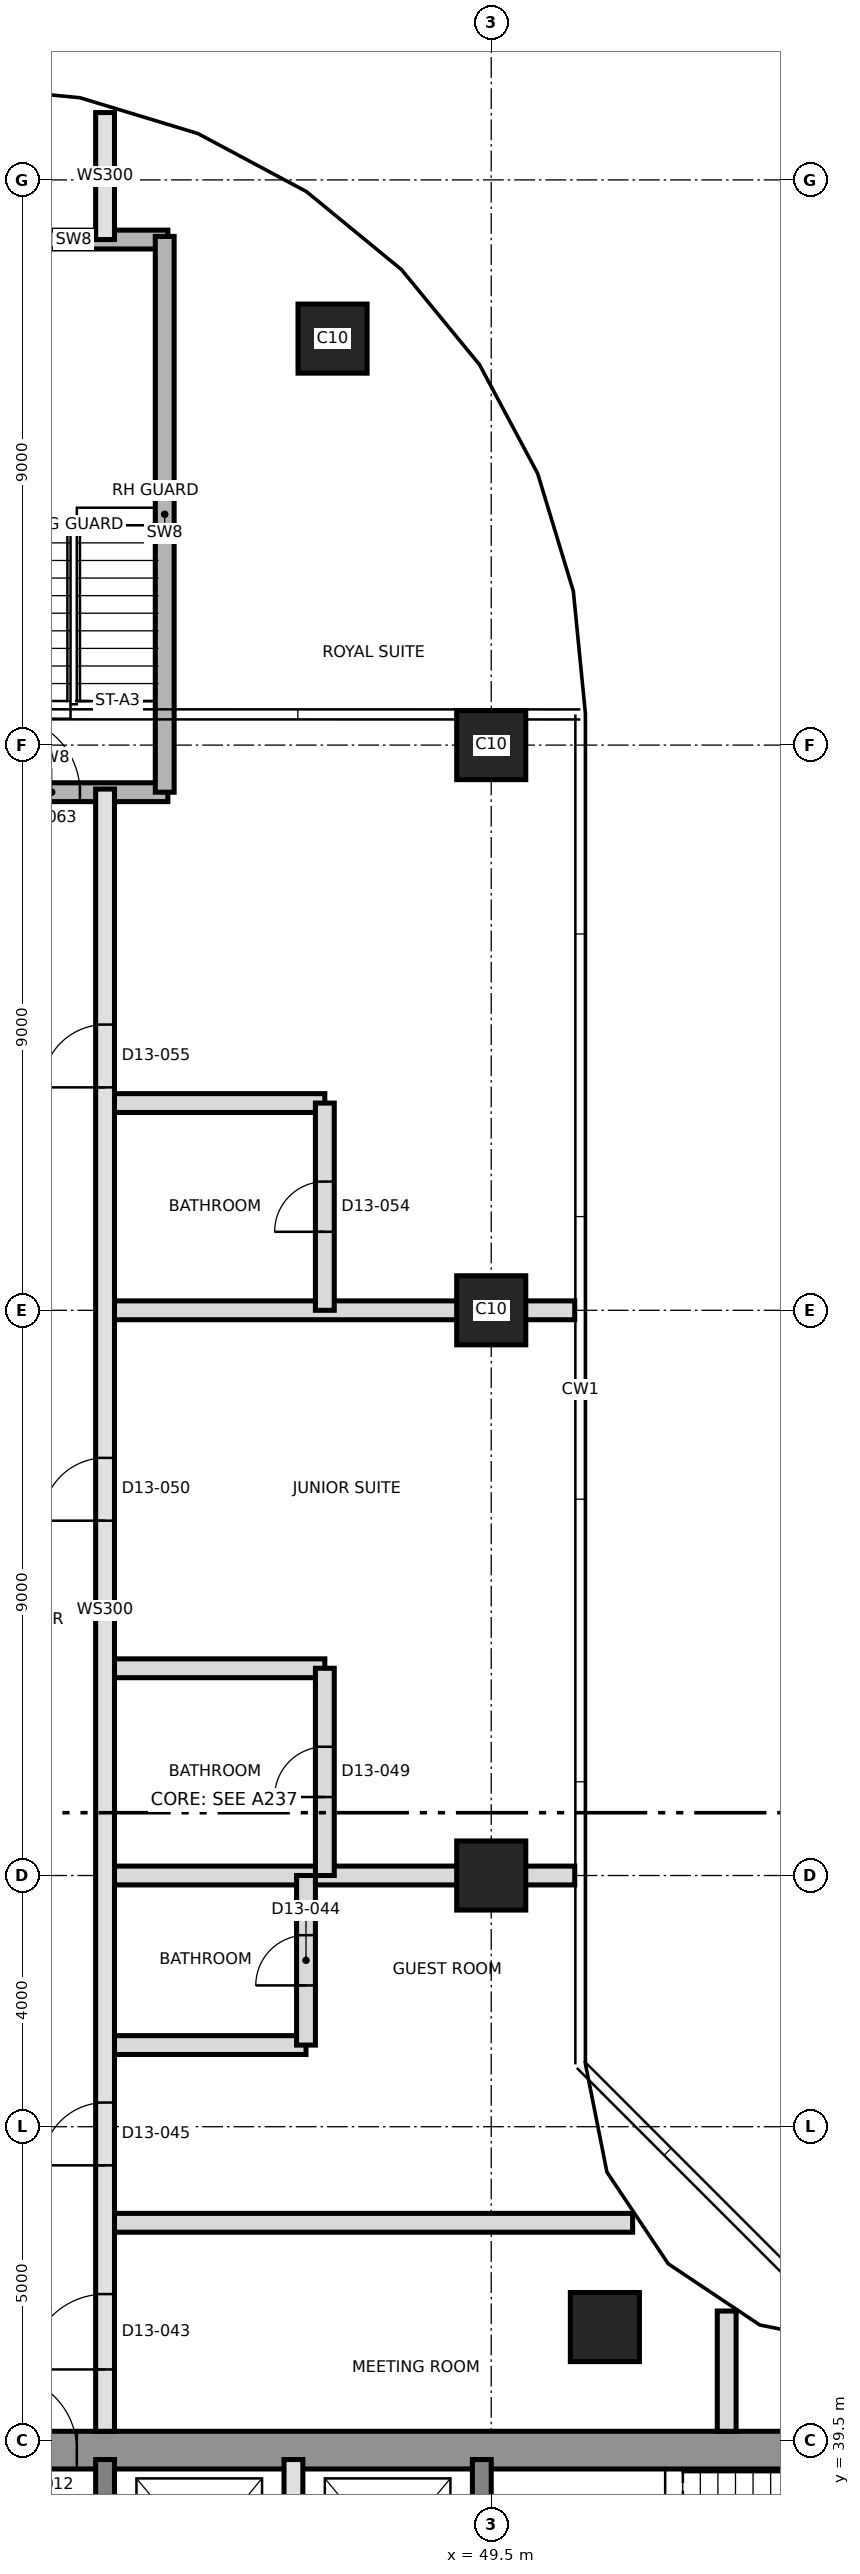
"""IFC4 building model, lengths in metres.
Left out: names, types, materials, properties, quantities, classifications, styles, units other than length and angle.
Written with IfcOpenShell. Run it as: python <this file> out.ifc"""

import sys

from ifc_helpers import new_model, si_unit, direction, frame, frame_2d, origin, origin_2d, place, context, subcontext, project, spatial, rectangle, extrude, element, fill, save


model = new_model("IFC4")
c1 = context("Model", 3, precision=1e-05, world=origin(), true_north=direction((0.0, 1.0)))
c2 = subcontext(c1, "Body", "Model", "MODEL_VIEW")
j1 = project(units=[si_unit("LENGTHUNIT", "METRE"), si_unit("PLANEANGLEUNIT", "RADIAN")], contexts=[c1])
p1 = place(None, origin())
s1 = spatial("IfcSite", under=j1, at=p1, CompositionType="ELEMENT")
p2 = place(p1, origin())
s2 = spatial("IfcBuilding", under=s1, at=p2, CompositionType="ELEMENT")
p3 = place(p2, frame((0.0, 0.0, 142.2)))
s3 = spatial("IfcBuildingStorey", under=s2, at=p3, CompositionType="ELEMENT", Elevation=142.2)
p4 = place(p3, frame((31.2, 39.35, 0.0), z_axis=(0.0, 0.0, 1.0), x_axis=(1.0, 0.0, 0.0)))
e1 = element("IfcWall", 1, at=p4, inside=s3, PredefinedType="SHEAR", context=c2, shape_type="SweptSolid", body=[
    extrude(rectangle(XDim=27.0, YDim=0.6, at=frame_2d((13.5, 0.0))), origin(), (0.0, 0.0, 1.0), 3.7),
])
p5 = place(p4, frame((10.5, 0.0, 0.0)))
e2 = element("IfcOpeningElement", 2, at=p5, cuts=e1, PredefinedType="OPENING", context=c2, shape_type="SweptSolid", body=[
    extrude(rectangle(XDim=1.2, YDim=2.1, at=frame_2d((0.6, 1.05))), frame((0.0, 0.31, 0.0), z_axis=(0.0, -1.0, 0.0), x_axis=(1.0, 0.0, 0.0)), (0.0, 0.0, 1.0), 0.62),
])
for number, where, z_axis, x_axis in (
    (3, (43.35, 33.5, 0.0), (0.0, 0.0, 1.0), (0.0, 1.0, 0.0)),
    (4, (49.35, 33.5, 0.0), (0.0, 0.0, 1.0), (0.0, 1.0, 0.0)),
):
    element("IfcWall", number, at=place(p3, frame(where, z_axis=z_axis, x_axis=x_axis)), inside=s3, PredefinedType="SHEAR", context=c2, shape_type="SweptSolid", body=[
        extrude(rectangle(XDim=5.7, YDim=0.3, at=frame_2d((2.85, 0.0))), origin(), (0.0, 0.0, 1.0), 3.7),
    ])
for number, where, z_axis, x_axis in (
    (5, (51.31, 41.31, 0.0), (0.0, 0.0, 1.0), (1.0, 0.0, 0.0)),
    (6, (49.5, 48.5, 0.0), (0.0, 0.0, 1.0), (1.0, 0.0, 0.0)),
    (7, (49.5, 57.5, 0.0), (0.0, 0.0, 1.0), (1.0, 0.0, 0.0)),
    (8, (49.5, 66.5, 0.0), (0.0, 0.0, 1.0), (1.0, 0.0, 0.0)),
    (9, (46.973, 72.973, 0.0), (0.0, 0.0, 1.0), (1.0, 0.0, 0.0)),
):
    element("IfcColumn", number, at=place(p3, frame(where, z_axis=z_axis, x_axis=x_axis)), inside=s3, PredefinedType="COLUMN", context=c2, shape_type="SweptSolid", body=[
        extrude(rectangle(XDim=1.1, YDim=1.1, at=origin_2d()), origin(), (0.0, 0.0, 1.0), 3.7),
    ])
p6 = place(p3, frame((46.35, 36.2, 0.0), z_axis=(0.0, 0.0, 1.0), x_axis=(0.0, 1.0, 0.0)))
e10 = element("IfcWall", 10, at=p6, inside=s3, PredefinedType="SOLIDWALL", context=c2, shape_type="SweptSolid", body=[
    extrude(rectangle(XDim=3.0, YDim=0.3, at=frame_2d((1.5, 0.0))), origin(), (0.0, 0.0, 1.0), 3.4),
])
p7 = place(p3, frame((43.35, 42.97, 0.0), z_axis=(0.0, 0.0, 1.0), x_axis=(1.0, 0.0, 0.0)))
e11 = element("IfcWall", 11, at=p7, inside=s3, PredefinedType="PARTITIONING", context=c2, shape_type="SweptSolid", body=[
    extrude(rectangle(XDim=8.402, YDim=0.3, at=frame_2d((4.201, 0.0))), origin(), (0.0, 0.0, 1.0), 3.4),
])
p8 = place(p3, frame((43.35, 45.8, 0.0), z_axis=(0.0, 0.0, 1.0), x_axis=(1.0, 0.0, 0.0)))
e12 = element("IfcWall", 12, at=p8, inside=s3, PredefinedType="PARTITIONING", context=c2, shape_type="SweptSolid", body=[
    extrude(rectangle(XDim=3.2, YDim=0.3, at=frame_2d((1.6, 0.0))), origin(), (0.0, 0.0, 1.0), 3.4),
])
p9 = place(p3, frame((43.35, 48.5, 0.0), z_axis=(0.0, 0.0, 1.0), x_axis=(1.0, 0.0, 0.0)))
e13 = element("IfcWall", 13, at=p9, inside=s3, PredefinedType="PARTITIONING", context=c2, shape_type="SweptSolid", body=[
    extrude(rectangle(XDim=7.48, YDim=0.3, at=frame_2d((3.74, 0.0))), origin(), (0.0, 0.0, 1.0), 3.4),
])
p10 = place(p3, frame((43.35, 51.8, 0.0), z_axis=(0.0, 0.0, 1.0), x_axis=(1.0, 0.0, 0.0)))
e14 = element("IfcWall", 14, at=p10, inside=s3, PredefinedType="PARTITIONING", context=c2, shape_type="SweptSolid", body=[
    extrude(rectangle(XDim=3.5, YDim=0.3, at=frame_2d((1.75, 0.0))), origin(), (0.0, 0.0, 1.0), 3.4),
])
p11 = place(p3, frame((43.35, 57.5, 0.0), z_axis=(0.0, 0.0, 1.0), x_axis=(1.0, 0.0, 0.0)))
e15 = element("IfcWall", 15, at=p11, inside=s3, PredefinedType="PARTITIONING", context=c2, shape_type="SweptSolid", body=[
    extrude(rectangle(XDim=7.48, YDim=0.3, at=frame_2d((3.74, 0.0))), origin(), (0.0, 0.0, 1.0), 3.4),
])
p12 = place(p3, frame((43.35, 60.8, 0.0), z_axis=(0.0, 0.0, 1.0), x_axis=(1.0, 0.0, 0.0)))
e16 = element("IfcWall", 16, at=p12, inside=s3, PredefinedType="PARTITIONING", context=c2, shape_type="SweptSolid", body=[
    extrude(rectangle(XDim=3.5, YDim=0.3, at=frame_2d((1.75, 0.0))), origin(), (0.0, 0.0, 1.0), 3.4),
])
p13 = place(p3, frame((40.65, 65.75, 0.0), z_axis=(0.0, 0.0, 1.0), x_axis=(1.0, 0.0, 0.0)))
e17 = element("IfcWall", 17, at=p13, inside=s3, PredefinedType="SHEAR", context=c2, shape_type="SweptSolid", body=[
    extrude(rectangle(XDim=3.7, YDim=0.3, at=frame_2d((1.85, 0.0))), origin(), (0.0, 0.0, 1.0), 3.4),
])
p14 = place(p13, frame((1.1, 0.0, 0.0)))
e18 = element("IfcOpeningElement", 18, at=p14, cuts=e17, PredefinedType="OPENING", context=c2, shape_type="SweptSolid", body=[
    extrude(rectangle(XDim=1.2, YDim=2.1, at=frame_2d((0.6, 1.05))), frame((0.0, 0.16, 0.0), z_axis=(0.0, -1.0, 0.0), x_axis=(1.0, 0.0, 0.0)), (0.0, 0.0, 1.0), 0.32),
])
p15 = place(p3, frame((41.35, 74.55, 0.0), z_axis=(0.0, 0.0, 1.0), x_axis=(1.0, 0.0, 0.0)))
e19 = element("IfcWall", 19, at=p15, inside=s3, PredefinedType="SHEAR", context=c2, shape_type="SweptSolid", body=[
    extrude(rectangle(XDim=3.0, YDim=0.3, at=frame_2d((1.5, 0.0))), origin(), (0.0, 0.0, 1.0), 3.4),
])
p16 = place(p3, frame((43.35, 39.65, 0.0), z_axis=(0.0, 0.0, 1.0), x_axis=(0.0, 1.0, 0.0)))
e20 = element("IfcWall", 20, at=p16, inside=s3, PredefinedType="SOLIDWALL", context=c2, shape_type="SweptSolid", body=[
    extrude(rectangle(XDim=26.15, YDim=0.3, at=frame_2d((13.075, 0.0))), origin(), (0.0, 0.0, 1.0), 3.4),
])
p17 = place(p16, frame((0.985, 0.0, 0.0)))
e21 = element("IfcOpeningElement", 21, at=p17, cuts=e20, PredefinedType="OPENING", context=c2, shape_type="SweptSolid", body=[
    extrude(rectangle(XDim=1.2, YDim=2.1, at=frame_2d((0.6, 1.05))), frame((0.0, 0.16, 0.0), z_axis=(0.0, -1.0, 0.0), x_axis=(1.0, 0.0, 0.0)), (0.0, 0.0, 1.0), 0.32),
])
p18 = place(p16, frame((4.235, 0.0, 0.0)))
e22 = element("IfcOpeningElement", 22, at=p18, cuts=e20, PredefinedType="OPENING", context=c2, shape_type="SweptSolid", body=[
    extrude(rectangle(XDim=1.0, YDim=2.1, at=frame_2d((0.5, 1.05))), frame((0.0, 0.16, 0.0), z_axis=(0.0, -1.0, 0.0), x_axis=(1.0, 0.0, 0.0)), (0.0, 0.0, 1.0), 0.32),
])
p19 = place(p16, frame((14.5, 0.0, 0.0)))
e23 = element("IfcOpeningElement", 23, at=p19, cuts=e20, PredefinedType="OPENING", context=c2, shape_type="SweptSolid", body=[
    extrude(rectangle(XDim=1.0, YDim=2.4, at=frame_2d((0.5, 1.2))), frame((0.0, 0.16, 0.0), z_axis=(0.0, -1.0, 0.0), x_axis=(1.0, 0.0, 0.0)), (0.0, 0.0, 1.0), 0.32),
])
p20 = place(p16, frame((21.4, 0.0, 0.0)))
e24 = element("IfcOpeningElement", 24, at=p20, cuts=e20, PredefinedType="OPENING", context=c2, shape_type="SweptSolid", body=[
    extrude(rectangle(XDim=1.0, YDim=2.4, at=frame_2d((0.5, 1.2))), frame((0.0, 0.16, 0.0), z_axis=(0.0, -1.0, 0.0), x_axis=(1.0, 0.0, 0.0)), (0.0, 0.0, 1.0), 0.32),
])
p21 = place(p3, frame((43.35, 74.55, 0.0), z_axis=(0.0, 0.0, 1.0), x_axis=(0.0, 1.0, 0.0)))
e25 = element("IfcWall", 25, at=p21, inside=s3, PredefinedType="SOLIDWALL", context=c2, shape_type="SweptSolid", body=[
    extrude(rectangle(XDim=2.022, YDim=0.3, at=frame_2d((1.011, 0.0))), origin(), (0.0, 0.0, 1.0), 3.4),
])
p22 = place(p3, frame((44.3, 65.75, 0.0), z_axis=(0.0, 0.0, 1.0), x_axis=(0.0, 1.0, 0.0)))
e26 = element("IfcWall", 26, at=p22, inside=s3, PredefinedType="SHEAR", context=c2, shape_type="SweptSolid", body=[
    extrude(rectangle(XDim=8.85, YDim=0.3, at=frame_2d((4.425, 0.0))), origin(), (0.0, 0.0, 1.0), 3.4),
])
p23 = place(p3, frame((46.55, 45.8, 0.0), z_axis=(0.0, 0.0, 1.0), x_axis=(0.0, 1.0, 0.0)))
e27 = element("IfcWall", 27, at=p23, inside=s3, PredefinedType="PARTITIONING", context=c2, shape_type="SweptSolid", body=[
    extrude(rectangle(XDim=2.7, YDim=0.3, at=frame_2d((1.35, 0.0))), origin(), (0.0, 0.0, 1.0), 3.4),
])
p24 = place(p23, frame((0.95, 0.0, 0.0)))
e28 = element("IfcOpeningElement", 28, at=p24, cuts=e27, PredefinedType="OPENING", context=c2, shape_type="SweptSolid", body=[
    extrude(rectangle(XDim=0.8, YDim=2.1, at=frame_2d((0.4, 1.05))), frame((0.0, 0.16, 0.0), z_axis=(0.0, -1.0, 0.0), x_axis=(1.0, 0.0, 0.0)), (0.0, 0.0, 1.0), 0.32),
])
p25 = place(p3, frame((46.85, 48.5, 0.0), z_axis=(0.0, 0.0, 1.0), x_axis=(0.0, 1.0, 0.0)))
e29 = element("IfcWall", 29, at=p25, inside=s3, PredefinedType="PARTITIONING", context=c2, shape_type="SweptSolid", body=[
    extrude(rectangle(XDim=3.3, YDim=0.3, at=frame_2d((1.65, 0.0))), origin(), (0.0, 0.0, 1.0), 3.4),
])
p26 = place(p25, frame((1.25, 0.0, 0.0)))
e30 = element("IfcOpeningElement", 30, at=p26, cuts=e29, PredefinedType="OPENING", context=c2, shape_type="SweptSolid", body=[
    extrude(rectangle(XDim=0.8, YDim=2.1, at=frame_2d((0.4, 1.05))), frame((0.0, 0.16, 0.0), z_axis=(0.0, -1.0, 0.0), x_axis=(1.0, 0.0, 0.0)), (0.0, 0.0, 1.0), 0.32),
])
p27 = place(p3, frame((46.85, 57.5, 0.0), z_axis=(0.0, 0.0, 1.0), x_axis=(0.0, 1.0, 0.0)))
e31 = element("IfcWall", 31, at=p27, inside=s3, PredefinedType="PARTITIONING", context=c2, shape_type="SweptSolid", body=[
    extrude(rectangle(XDim=3.3, YDim=0.3, at=frame_2d((1.65, 0.0))), origin(), (0.0, 0.0, 1.0), 3.4),
])
p28 = place(p27, frame((1.25, 0.0, 0.0)))
e32 = element("IfcOpeningElement", 32, at=p28, cuts=e31, PredefinedType="OPENING", context=c2, shape_type="SweptSolid", body=[
    extrude(rectangle(XDim=0.8, YDim=2.1, at=frame_2d((0.4, 1.05))), frame((0.0, 0.16, 0.0), z_axis=(0.0, -1.0, 0.0), x_axis=(1.0, 0.0, 0.0)), (0.0, 0.0, 1.0), 0.32),
])
p29 = place(p3, frame((53.25, 39.65, 0.0), z_axis=(0.0, 0.0, 1.0), x_axis=(0.0, 1.0, 0.0)))
e33 = element("IfcWall", 33, at=p29, inside=s3, PredefinedType="PARTITIONING", context=c2, shape_type="SweptSolid", body=[
    extrude(rectangle(XDim=1.915, YDim=0.3, at=frame_2d((0.958, 0.0))), origin(), (0.0, 0.0, 1.0), 3.4),
])
p30 = place(p5, origin())
e34 = element("IfcDoor", 34, at=p30, inside=s3, OperationType="SINGLE_SWING_RIGHT", PredefinedType="DOOR", context=c2, shape_type="SweptSolid", body=[
    extrude(rectangle(XDim=1.2, YDim=2.1, at=frame_2d((0.6, 1.05))), frame((0.0, 0.025, 0.0), z_axis=(0.0, -1.0, 0.0), x_axis=(1.0, 0.0, 0.0)), (0.0, 0.0, 1.0), 0.05),
])
fill(e2, e34)
p31 = place(p17, origin())
e35 = element("IfcDoor", 35, at=p31, inside=s3, OperationType="SINGLE_SWING_RIGHT", PredefinedType="DOOR", context=c2, shape_type="SweptSolid", body=[
    extrude(rectangle(XDim=1.2, YDim=2.1, at=frame_2d((0.6, 1.05))), frame((0.0, 0.025, 0.0), z_axis=(0.0, -1.0, 0.0), x_axis=(1.0, 0.0, 0.0)), (0.0, 0.0, 1.0), 0.05),
])
fill(e21, e35)
p32 = place(p24, origin())
e36 = element("IfcDoor", 36, at=p32, inside=s3, OperationType="SINGLE_SWING_LEFT", PredefinedType="DOOR", context=c2, shape_type="SweptSolid", body=[
    extrude(rectangle(XDim=0.8, YDim=2.1, at=frame_2d((0.4, 1.05))), frame((0.0, 0.025, 0.0), z_axis=(0.0, -1.0, 0.0), x_axis=(1.0, 0.0, 0.0)), (0.0, 0.0, 1.0), 0.05),
])
fill(e28, e36)
p33 = place(p18, origin())
e37 = element("IfcDoor", 37, at=p33, inside=s3, OperationType="SINGLE_SWING_LEFT", PredefinedType="DOOR", context=c2, shape_type="SweptSolid", body=[
    extrude(rectangle(XDim=1.0, YDim=2.1, at=frame_2d((0.5, 1.05))), frame((0.0, 0.025, 0.0), z_axis=(0.0, -1.0, 0.0), x_axis=(1.0, 0.0, 0.0)), (0.0, 0.0, 1.0), 0.05),
])
fill(e22, e37)
p34 = place(p26, origin())
e38 = element("IfcDoor", 38, at=p34, inside=s3, OperationType="SINGLE_SWING_LEFT", PredefinedType="DOOR", context=c2, shape_type="SweptSolid", body=[
    extrude(rectangle(XDim=0.8, YDim=2.1, at=frame_2d((0.4, 1.05))), frame((0.0, 0.025, 0.0), z_axis=(0.0, -1.0, 0.0), x_axis=(1.0, 0.0, 0.0)), (0.0, 0.0, 1.0), 0.05),
])
fill(e30, e38)
p35 = place(p19, origin())
e39 = element("IfcDoor", 39, at=p35, inside=s3, OperationType="SINGLE_SWING_RIGHT", PredefinedType="DOOR", context=c2, shape_type="SweptSolid", body=[
    extrude(rectangle(XDim=1.0, YDim=2.4, at=frame_2d((0.5, 1.2))), frame((0.0, 0.025, 0.0), z_axis=(0.0, -1.0, 0.0), x_axis=(1.0, 0.0, 0.0)), (0.0, 0.0, 1.0), 0.05),
])
fill(e23, e39)
p36 = place(p28, origin())
e40 = element("IfcDoor", 40, at=p36, inside=s3, OperationType="SINGLE_SWING_RIGHT", PredefinedType="DOOR", context=c2, shape_type="SweptSolid", body=[
    extrude(rectangle(XDim=0.8, YDim=2.1, at=frame_2d((0.4, 1.05))), frame((0.0, 0.025, 0.0), z_axis=(0.0, -1.0, 0.0), x_axis=(1.0, 0.0, 0.0)), (0.0, 0.0, 1.0), 0.05),
])
fill(e32, e40)
p37 = place(p20, origin())
e41 = element("IfcDoor", 41, at=p37, inside=s3, OperationType="SINGLE_SWING_LEFT", PredefinedType="DOOR", context=c2, shape_type="SweptSolid", body=[
    extrude(rectangle(XDim=1.0, YDim=2.4, at=frame_2d((0.5, 1.2))), frame((0.0, 0.025, 0.0), z_axis=(0.0, -1.0, 0.0), x_axis=(1.0, 0.0, 0.0)), (0.0, 0.0, 1.0), 0.05),
])
fill(e24, e41)
p38 = place(p14, origin())
e42 = element("IfcDoor", 42, at=p38, inside=s3, OperationType="SINGLE_SWING_RIGHT", PredefinedType="DOOR", context=c2, shape_type="SweptSolid", body=[
    extrude(rectangle(XDim=1.2, YDim=2.1, at=frame_2d((0.6, 1.05))), frame((0.0, 0.025, 0.0), z_axis=(0.0, -1.0, 0.0), x_axis=(1.0, 0.0, 0.0)), (0.0, 0.0, 1.0), 0.05),
])
fill(e18, e42)
save(model, sys.argv[1])
